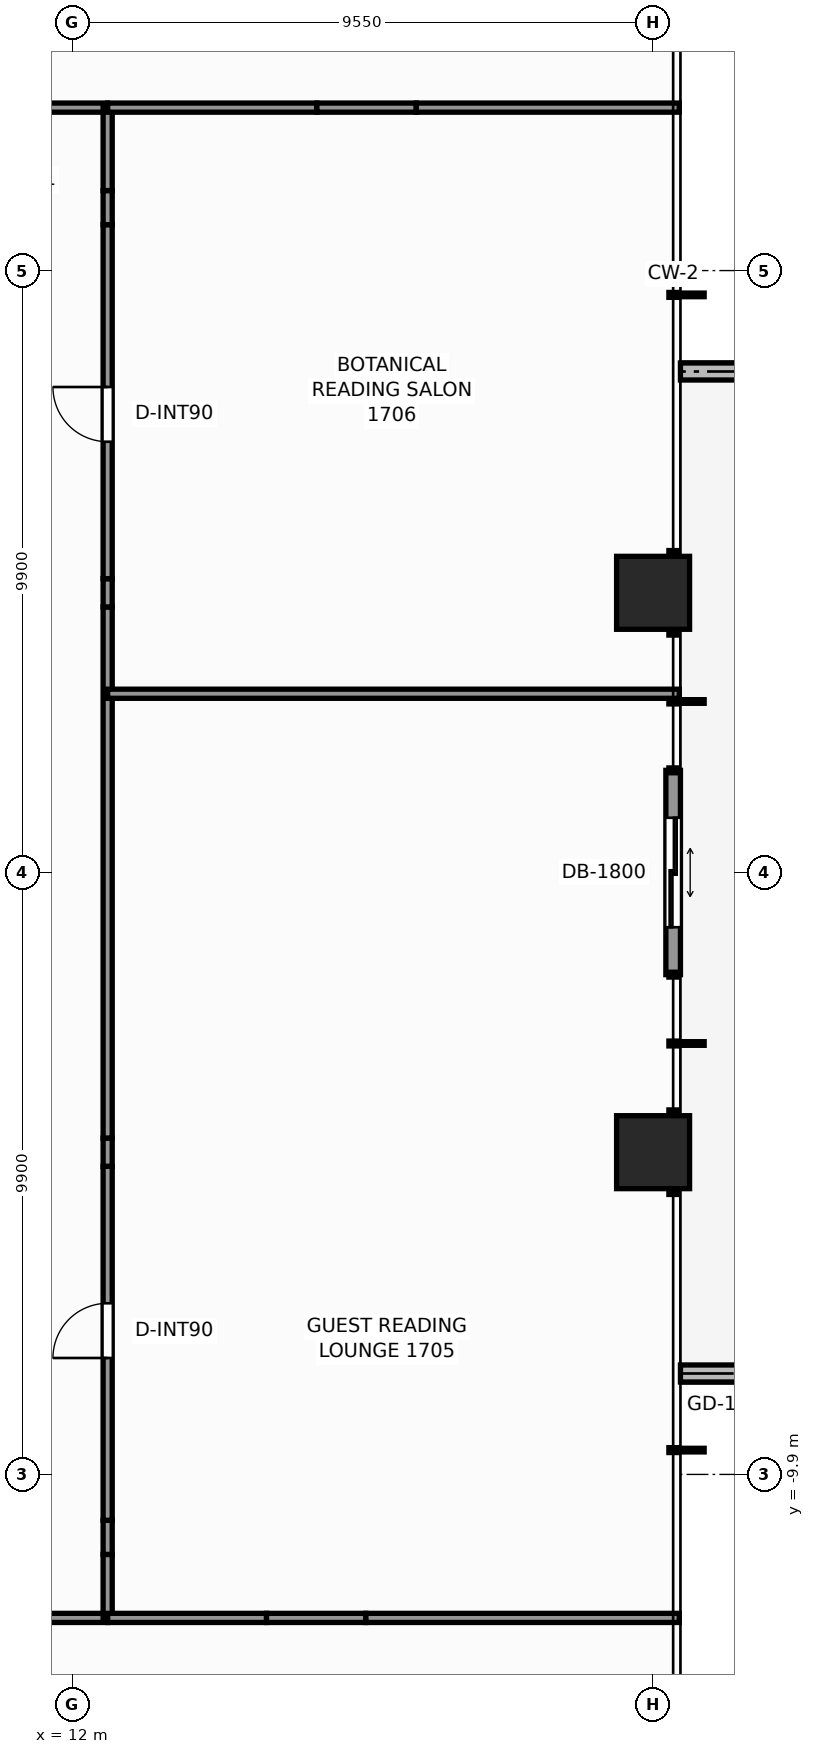
"""IFC4 building model, lengths in metres.
Left out: names, types, materials, properties, quantities, classifications, styles, units other than length and angle.
Written with IfcOpenShell. Run it as: python <this file> out.ifc"""

import sys

from ifc_helpers import new_model, si_unit, direction, frame, frame_2d, origin, origin_2d, place, context, subcontext, project, spatial, rectangle, extrude, element, fill, save


model = new_model("IFC4")
c1 = context("Model", 3, precision=1e-05, world=origin(), true_north=direction((0.0, 1.0)))
c2 = subcontext(c1, "Body", "Model", "MODEL_VIEW")
j1 = project(units=[si_unit("LENGTHUNIT", "METRE"), si_unit("PLANEANGLEUNIT", "RADIAN")], contexts=[c1])
p1 = place(None, origin())
s1 = spatial("IfcSite", under=j1, at=p1, CompositionType="ELEMENT")
p2 = place(p1, origin())
s2 = spatial("IfcBuilding", under=s1, at=p2, CompositionType="ELEMENT")
p3 = place(p2, frame((0.0, 0.0, 60.1)))
s3 = spatial("IfcBuildingStorey", under=s2, at=p3, CompositionType="ELEMENT", Elevation=60.1)
for number, where, z_axis, x_axis in (
    (1, (21.55, -4.6, 0.0), (0.0, 0.0, 1.0), (1.0, 0.0, 0.0)),
    (2, (21.55, 4.6, 0.0), (0.0, 0.0, 1.0), (1.0, 0.0, 0.0)),
):
    element("IfcColumn", number, at=place(p3, frame(where, z_axis=z_axis, x_axis=x_axis)), inside=s3, PredefinedType="COLUMN", context=c2, shape_type="SweptSolid", body=[
        extrude(rectangle(XDim=1.2, YDim=1.2, at=origin_2d()), origin(), (0.0, 0.0, 1.0), 3.3),
    ])
p4 = place(p3, frame((23.313, 8.24, -0.06), z_axis=(0.0, 0.0, 1.0), x_axis=(-1.0, 0.0, 0.0)))
e3 = element("IfcWall", 3, at=p4, inside=s3, PredefinedType="PARAPET", context=c2, shape_type="SweptSolid", body=[
    extrude(rectangle(XDim=1.313, YDim=0.28, at=frame_2d((0.656, 0.0))), origin(), (0.0, 0.0, 1.0), 0.42),
])
p5 = place(p3, frame((22.0, -8.24, -0.06), z_axis=(0.0, 0.0, 1.0), x_axis=(1.0, 0.0, 0.0)))
e4 = element("IfcWall", 4, at=p5, inside=s3, PredefinedType="PARAPET", context=c2, shape_type="SweptSolid", body=[
    extrude(rectangle(XDim=1.705, YDim=0.28, at=frame_2d((0.853, 0.0))), origin(), (0.0, 0.0, 1.0), 0.42),
])
p6 = place(p3, frame((21.88, 1.68, 0.0), z_axis=(0.0, 0.0, 1.0), x_axis=(0.0, -1.0, 0.0)))
e5 = element("IfcWall", 5, at=p6, inside=s3, PredefinedType="STANDARD", context=c2, shape_type="SweptSolid", body=[
    extrude(rectangle(XDim=3.36, YDim=0.24, at=frame_2d((1.68, 0.0))), origin(), (0.0, 0.0, 1.0), 2.95),
])
p7 = place(p6, frame((0.78, 0.0, 0.0)))
e6 = element("IfcOpeningElement", 6, at=p7, cuts=e5, PredefinedType="OPENING", context=c2, shape_type="SweptSolid", body=[
    extrude(rectangle(XDim=1.8, YDim=2.2, at=frame_2d((0.9, 1.1))), frame((0.0, 0.13, 0.0), z_axis=(0.0, -1.0, 0.0), x_axis=(1.0, 0.0, 0.0)), (0.0, 0.0, 1.0), 0.26),
])
p8 = place(p3, frame((11.092, -12.26, 0.0), z_axis=(0.0, 0.0, 1.0), x_axis=(1.0, 0.0, 0.0)))
e7 = element("IfcWall", 7, at=p8, inside=s3, PredefinedType="PARTITIONING", context=c2, shape_type="SweptSolid", body=[
    extrude(rectangle(XDim=1.488, YDim=0.15, at=frame_2d((0.744, 0.0))), origin(), (0.0, 0.0, 1.0), 2.95),
])
p9 = place(p3, frame((11.216, 12.58, 0.0), z_axis=(0.0, 0.0, 1.0), x_axis=(1.0, 0.0, 0.0)))
e8 = element("IfcWall", 8, at=p9, inside=s3, PredefinedType="PARTITIONING", context=c2, shape_type="SweptSolid", body=[
    extrude(rectangle(XDim=1.364, YDim=0.15, at=frame_2d((0.682, 0.0))), origin(), (0.0, 0.0, 1.0), 2.95),
])
p10 = place(p3, frame((12.58, -12.26, 0.0), z_axis=(0.0, 0.0, 1.0), x_axis=(0.0, 1.0, 0.0)))
e9 = element("IfcWall", 9, at=p10, inside=s3, PredefinedType="PARTITIONING", context=c2, shape_type="SweptSolid", body=[
    extrude(rectangle(XDim=1.044, YDim=0.15, at=frame_2d((0.522, 0.0))), origin(), (0.0, 0.0, 1.0), 2.95),
])
p11 = place(p3, frame((12.58, -11.216, 0.0), z_axis=(0.0, 0.0, 1.0), x_axis=(0.0, 1.0, 0.0)))
e10 = element("IfcWall", 10, at=p11, inside=s3, PredefinedType="PARTITIONING", context=c2, shape_type="SweptSolid", body=[
    extrude(rectangle(XDim=0.561, YDim=0.15, at=frame_2d((0.281, 0.0))), origin(), (0.0, 0.0, 1.0), 2.162),
])
p12 = place(p3, frame((12.58, -10.655, 0.0), z_axis=(0.0, 0.0, 1.0), x_axis=(0.0, 1.0, 0.0)))
e11 = element("IfcWall", 11, at=p12, inside=s3, PredefinedType="PARTITIONING", context=c2, shape_type="SweptSolid", body=[
    extrude(rectangle(XDim=5.822, YDim=0.15, at=frame_2d((2.911, 0.0))), origin(), (0.0, 0.0, 1.0), 2.95),
])
p13 = place(p12, frame((2.669, 0.0, 0.0)))
e12 = element("IfcOpeningElement", 12, at=p13, cuts=e11, PredefinedType="OPENING", context=c2, shape_type="SweptSolid", body=[
    extrude(rectangle(XDim=0.9, YDim=2.06, at=frame_2d((0.45, 1.03))), frame((0.0, 0.085, 0.0), z_axis=(0.0, -1.0, 0.0), x_axis=(1.0, 0.0, 0.0)), (0.0, 0.0, 1.0), 0.17),
])
p14 = place(p3, frame((12.58, -4.833, 0.0), z_axis=(0.0, 0.0, 1.0), x_axis=(0.0, 1.0, 0.0)))
e13 = element("IfcWall", 13, at=p14, inside=s3, PredefinedType="PARTITIONING", context=c2, shape_type="SweptSolid", body=[
    extrude(rectangle(XDim=0.465, YDim=0.15, at=frame_2d((0.232, 0.0))), origin(), (0.0, 0.0, 1.0), 2.162),
])
p15 = place(p3, frame((12.58, -4.367, 0.0), z_axis=(0.0, 0.0, 1.0), x_axis=(0.0, 1.0, 0.0)))
e14 = element("IfcWall", 14, at=p15, inside=s3, PredefinedType="PARTITIONING", context=c2, shape_type="SweptSolid", body=[
    extrude(rectangle(XDim=8.735, YDim=0.15, at=frame_2d((4.367, 0.0))), origin(), (0.0, 0.0, 1.0), 2.475),
])
p16 = place(p3, frame((12.58, 4.367, 0.0), z_axis=(0.0, 0.0, 1.0), x_axis=(0.0, 1.0, 0.0)))
e15 = element("IfcWall", 15, at=p16, inside=s3, PredefinedType="PARTITIONING", context=c2, shape_type="SweptSolid", body=[
    extrude(rectangle(XDim=0.465, YDim=0.15, at=frame_2d((0.232, 0.0))), origin(), (0.0, 0.0, 1.0), 2.162),
])
p17 = place(p3, frame((12.58, 4.833, 0.0), z_axis=(0.0, 0.0, 1.0), x_axis=(0.0, 1.0, 0.0)))
e16 = element("IfcWall", 16, at=p17, inside=s3, PredefinedType="PARTITIONING", context=c2, shape_type="SweptSolid", body=[
    extrude(rectangle(XDim=5.822, YDim=0.15, at=frame_2d((2.911, 0.0))), origin(), (0.0, 0.0, 1.0), 2.95),
])
p18 = place(p17, frame((2.252, 0.0, 0.0)))
e17 = element("IfcOpeningElement", 17, at=p18, cuts=e16, PredefinedType="OPENING", context=c2, shape_type="SweptSolid", body=[
    extrude(rectangle(XDim=0.9, YDim=2.06, at=frame_2d((0.45, 1.03))), frame((0.0, 0.085, 0.0), z_axis=(0.0, -1.0, 0.0), x_axis=(1.0, 0.0, 0.0)), (0.0, 0.0, 1.0), 0.17),
])
p19 = place(p3, frame((12.58, 10.655, 0.0), z_axis=(0.0, 0.0, 1.0), x_axis=(0.0, 1.0, 0.0)))
e18 = element("IfcWall", 18, at=p19, inside=s3, PredefinedType="PARTITIONING", context=c2, shape_type="SweptSolid", body=[
    extrude(rectangle(XDim=0.561, YDim=0.15, at=frame_2d((0.281, 0.0))), origin(), (0.0, 0.0, 1.0), 2.162),
])
p20 = place(p3, frame((12.58, 11.216, 0.0), z_axis=(0.0, 0.0, 1.0), x_axis=(0.0, 1.0, 0.0)))
e19 = element("IfcWall", 19, at=p20, inside=s3, PredefinedType="PARTITIONING", context=c2, shape_type="SweptSolid", body=[
    extrude(rectangle(XDim=1.364, YDim=0.15, at=frame_2d((0.682, 0.0))), origin(), (0.0, 0.0, 1.0), 2.95),
])
p21 = place(p3, frame((12.58, -12.26, 0.0), z_axis=(0.0, 0.0, 1.0), x_axis=(1.0, 0.0, 0.0)))
e20 = element("IfcWall", 20, at=p21, inside=s3, PredefinedType="PARTITIONING", context=c2, shape_type="SweptSolid", body=[
    extrude(rectangle(XDim=2.613, YDim=0.15, at=frame_2d((1.306, 0.0))), origin(), (0.0, 0.0, 1.0), 2.95),
])
p22 = place(p3, frame((15.193, -12.26, 0.0), z_axis=(0.0, 0.0, 1.0), x_axis=(1.0, 0.0, 0.0)))
e21 = element("IfcWall", 21, at=p22, inside=s3, PredefinedType="PARTITIONING", context=c2, shape_type="SweptSolid", body=[
    extrude(rectangle(XDim=1.634, YDim=0.15, at=frame_2d((0.817, 0.0))), origin(), (0.0, 0.0, 1.0), 2.162),
])
p23 = place(p3, frame((16.827, -12.26, 0.0), z_axis=(0.0, 0.0, 1.0), x_axis=(1.0, 0.0, 0.0)))
e22 = element("IfcWall", 22, at=p23, inside=s3, PredefinedType="PARTITIONING", context=c2, shape_type="SweptSolid", body=[
    extrude(rectangle(XDim=5.153, YDim=0.15, at=frame_2d((2.577, 0.0))), origin(), (0.0, 0.0, 1.0), 2.319),
])
p24 = place(p3, frame((12.58, 12.58, 0.0), z_axis=(0.0, 0.0, 1.0), x_axis=(1.0, 0.0, 0.0)))
e23 = element("IfcWall", 23, at=p24, inside=s3, PredefinedType="PARTITIONING", context=c2, shape_type="SweptSolid", body=[
    extrude(rectangle(XDim=3.441, YDim=0.15, at=frame_2d((1.72, 0.0))), origin(), (0.0, 0.0, 1.0), 2.95),
])
p25 = place(p3, frame((16.021, 12.58, 0.0), z_axis=(0.0, 0.0, 1.0), x_axis=(1.0, 0.0, 0.0)))
e24 = element("IfcWall", 24, at=p25, inside=s3, PredefinedType="PARTITIONING", context=c2, shape_type="SweptSolid", body=[
    extrude(rectangle(XDim=1.635, YDim=0.15, at=frame_2d((0.817, 0.0))), origin(), (0.0, 0.0, 1.0), 2.162),
])
p26 = place(p3, frame((17.656, 12.58, 0.0), z_axis=(0.0, 0.0, 1.0), x_axis=(1.0, 0.0, 0.0)))
e25 = element("IfcWall", 25, at=p26, inside=s3, PredefinedType="PARTITIONING", context=c2, shape_type="SweptSolid", body=[
    extrude(rectangle(XDim=4.324, YDim=0.15, at=frame_2d((2.162, 0.0))), origin(), (0.0, 0.0, 1.0), 2.319),
])
p27 = place(p3, frame((12.58, 2.94, 0.0), z_axis=(0.0, 0.0, 1.0), x_axis=(1.0, 0.0, 0.0)))
e26 = element("IfcWall", 26, at=p27, inside=s3, PredefinedType="PARTITIONING", context=c2, shape_type="SweptSolid", body=[
    extrude(rectangle(XDim=9.4, YDim=0.15, at=frame_2d((4.7, 0.0))), origin(), (0.0, 0.0, 1.0), 2.319),
])
p28 = place(p7, origin())
e27 = element("IfcDoor", 27, at=p28, inside=s3, OperationType="DOUBLE_DOOR_SLIDING", PredefinedType="DOOR", context=c2, shape_type="SweptSolid", body=[
    extrude(rectangle(XDim=1.8, YDim=2.2, at=frame_2d((0.9, 1.1))), frame((0.0, 0.025, 0.0), z_axis=(0.0, -1.0, 0.0), x_axis=(1.0, 0.0, 0.0)), (0.0, 0.0, 1.0), 0.05),
])
fill(e6, e27)
p29 = place(p13, origin())
e28 = element("IfcDoor", 28, at=p29, inside=s3, OperationType="SINGLE_SWING_LEFT", PredefinedType="DOOR", context=c2, shape_type="SweptSolid", body=[
    extrude(rectangle(XDim=0.9, YDim=2.06, at=frame_2d((0.45, 1.03))), frame((0.0, 0.025, 0.0), z_axis=(0.0, -1.0, 0.0), x_axis=(1.0, 0.0, 0.0)), (0.0, 0.0, 1.0), 0.05),
])
fill(e12, e28)
p30 = place(p18, origin())
e29 = element("IfcDoor", 29, at=p30, inside=s3, OperationType="SINGLE_SWING_RIGHT", PredefinedType="DOOR", context=c2, shape_type="SweptSolid", body=[
    extrude(rectangle(XDim=0.9, YDim=2.06, at=frame_2d((0.45, 1.03))), frame((0.0, 0.025, 0.0), z_axis=(0.0, -1.0, 0.0), x_axis=(1.0, 0.0, 0.0)), (0.0, 0.0, 1.0), 0.05),
])
fill(e17, e29)
save(model, sys.argv[1])
